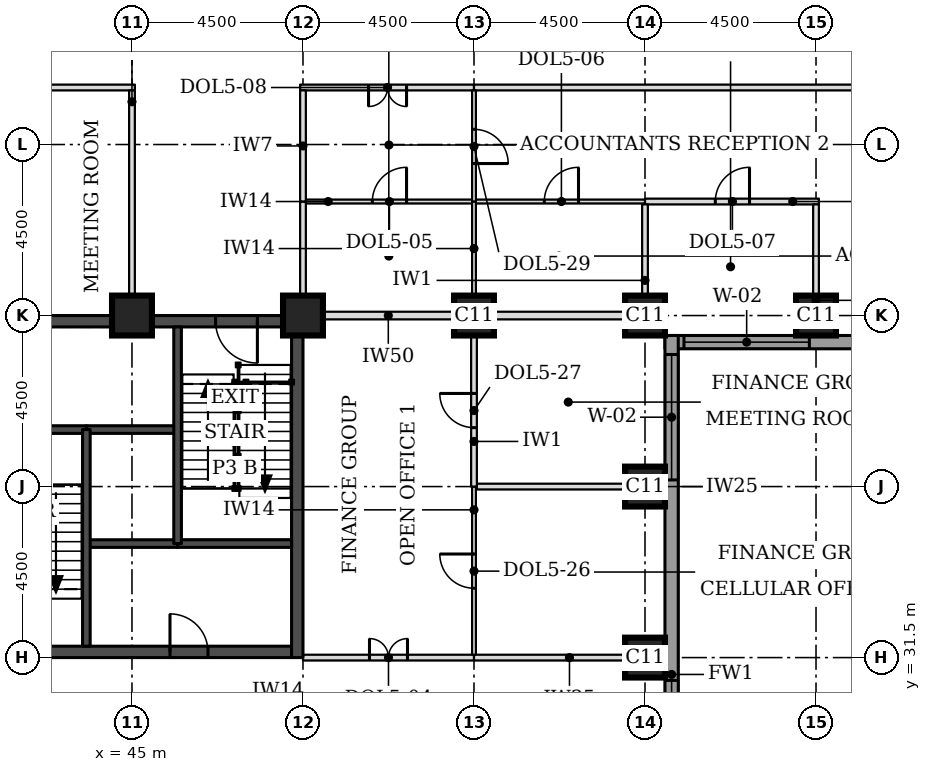
"""IFC4 building model, lengths in metres.
Left out: names, types, materials, properties, quantities, classifications, styles, units other than length and angle.
Written with IfcOpenShell. Run it as: python <this file> out.ifc"""

import sys

from ifc_helpers import new_model, si_unit, direction, frame, frame_2d, origin, origin_2d, place, context, subcontext, project, spatial, rectangle, extrude, element, fill, save


model = new_model("IFC4")
c1 = context("Model", 3, precision=1e-05, world=origin(), true_north=direction((0.0, 1.0)))
c2 = subcontext(c1, "Body", "Model", "MODEL_VIEW")
j1 = project(units=[si_unit("LENGTHUNIT", "METRE"), si_unit("PLANEANGLEUNIT", "RADIAN")], contexts=[c1])
p1 = place(None, origin())
s1 = spatial("IfcSite", under=j1, at=p1, CompositionType="ELEMENT")
p2 = place(p1, origin())
s2 = spatial("IfcBuilding", under=s1, at=p2, CompositionType="ELEMENT")
p3 = place(p2, frame((0.0, 0.0, 108.5)))
s3 = spatial("IfcBuildingStorey", under=s2, at=p3, CompositionType="ELEMENT", Elevation=108.5)
for number, where, z_axis, x_axis in (
    (1, (58.5, 31.5, 0.0), (0.0, 0.0, 1.0), (1.0, 0.0, 0.0)),
    (2, (58.5, 36.0, 0.0), (0.0, 0.0, 1.0), (1.0, 0.0, 0.0)),
    (3, (45.0, 40.5, 0.0), (0.0, 0.0, 1.0), (1.0, 0.0, 0.0)),
    (4, (49.5, 40.5, 0.0), (0.0, 0.0, 1.0), (1.0, 0.0, 0.0)),
    (5, (54.0, 40.5, 0.0), (0.0, 0.0, 1.0), (1.0, 0.0, 0.0)),
    (6, (58.5, 40.5, 0.0), (0.0, 0.0, 1.0), (1.0, 0.0, 0.0)),
    (7, (63.0, 40.5, 0.0), (0.0, 0.0, 1.0), (1.0, 0.0, 0.0)),
):
    element("IfcColumn", number, at=place(p3, frame(where, z_axis=z_axis, x_axis=x_axis)), inside=s3, PredefinedType="COLUMN", context=c2, shape_type="SweptSolid", body=[
        extrude(rectangle(XDim=1.05, YDim=1.05, at=origin_2d()), origin(), (0.0, 0.0, 1.0), 3.7),
    ])
p4 = place(p3, frame((40.8, 31.65, 0.0), z_axis=(0.0, 0.0, 1.0), x_axis=(1.0, 0.0, 0.0)))
e8 = element("IfcWall", 8, at=p4, inside=s3, PredefinedType="SHEAR", context=c2, shape_type="SweptSolid", body=[
    extrude(rectangle(XDim=8.4, YDim=0.3, at=frame_2d((4.2, 0.0))), origin(), (0.0, 0.0, 1.0), 3.7),
])
p5 = place(p4, frame((5.2, 0.0, 0.0)))
e9 = element("IfcOpeningElement", 9, at=p5, cuts=e8, PredefinedType="OPENING", context=c2, shape_type="SweptSolid", body=[
    extrude(rectangle(XDim=1.0, YDim=2.1, at=frame_2d((0.5, 1.05))), frame((0.0, 0.16, 0.0), z_axis=(0.0, -1.0, 0.0), x_axis=(1.0, 0.0, 0.0)), (0.0, 0.0, 1.0), 0.32),
])
p6 = place(p3, frame((40.8, 40.35, 0.0), z_axis=(0.0, 0.0, 1.0), x_axis=(1.0, 0.0, 0.0)))
e10 = element("IfcWall", 10, at=p6, inside=s3, PredefinedType="SHEAR", context=c2, shape_type="SweptSolid", body=[
    extrude(rectangle(XDim=8.4, YDim=0.3, at=frame_2d((4.2, 0.0))), origin(), (0.0, 0.0, 1.0), 3.7),
])
p7 = place(p6, frame((6.4, 0.0, 0.0)))
e11 = element("IfcOpeningElement", 11, at=p7, cuts=e10, PredefinedType="OPENING", context=c2, shape_type="SweptSolid", body=[
    extrude(rectangle(XDim=1.1, YDim=2.1, at=frame_2d((0.55, 1.05))), frame((0.0, 0.16, 0.0), z_axis=(0.0, -1.0, 0.0), x_axis=(1.0, 0.0, 0.0)), (0.0, 0.0, 1.0), 0.32),
])
p8 = place(p3, frame((49.35, 31.5, 0.0), z_axis=(0.0, 0.0, 1.0), x_axis=(0.0, 1.0, 0.0)))
e12 = element("IfcWall", 12, at=p8, inside=s3, PredefinedType="SHEAR", context=c2, shape_type="SweptSolid", body=[
    extrude(rectangle(XDim=9.0, YDim=0.3, at=frame_2d((4.5, 0.0))), origin(), (0.0, 0.0, 1.0), 3.7),
])
p9 = place(p3, frame((59.025, 39.8, 0.0), z_axis=(0.0, 0.0, 1.0), x_axis=(1.0, 0.0, 0.0)))
e13 = element("IfcWall", 13, at=p9, inside=s3, PredefinedType="STANDARD", context=c2, shape_type="SweptSolid", body=[
    extrude(rectangle(XDim=13.337, YDim=0.35, at=frame_2d((6.669, 0.0))), origin(), (0.0, 0.0, 1.0), 3.525),
])
p10 = place(p9, frame((0.5, 0.0, 0.9)))
e14 = element("IfcOpeningElement", 14, at=p10, cuts=e13, PredefinedType="OPENING", context=c2, shape_type="SweptSolid", body=[
    extrude(rectangle(XDim=3.3, YDim=1.9, at=frame_2d((1.65, 0.95))), frame((0.0, 0.185, 0.0), z_axis=(0.0, -1.0, 0.0), x_axis=(1.0, 0.0, 0.0)), (0.0, 0.0, 1.0), 0.37),
])
p11 = place(p3, frame((59.2, 22.138, 0.0), z_axis=(0.0, 0.0, 1.0), x_axis=(0.0, 1.0, 0.0)))
e15 = element("IfcWall", 15, at=p11, inside=s3, PredefinedType="STANDARD", context=c2, shape_type="SweptSolid", body=[
    extrude(rectangle(XDim=17.837, YDim=0.35, at=frame_2d((8.919, 0.0))), origin(), (0.0, 0.0, 1.0), 3.525),
])
p12 = place(p11, frame((5.462, 0.0, 0.9)))
e16 = element("IfcOpeningElement", 16, at=p12, cuts=e15, PredefinedType="OPENING", context=c2, shape_type="SweptSolid", body=[
    extrude(rectangle(XDim=3.3, YDim=1.9, at=frame_2d((1.65, 0.95))), frame((0.0, 0.185, 0.0), z_axis=(0.0, -1.0, 0.0), x_axis=(1.0, 0.0, 0.0)), (0.0, 0.0, 1.0), 0.37),
])
p13 = place(p11, frame((14.037, 0.0, 0.9)))
e17 = element("IfcOpeningElement", 17, at=p13, cuts=e15, PredefinedType="OPENING", context=c2, shape_type="SweptSolid", body=[
    extrude(rectangle(XDim=3.3, YDim=1.9, at=frame_2d((1.65, 0.95))), frame((0.0, 0.185, 0.0), z_axis=(0.0, -1.0, 0.0), x_axis=(1.0, 0.0, 0.0)), (0.0, 0.0, 1.0), 0.37),
])
p14 = place(p3, frame((49.5, 31.5, 0.0), z_axis=(0.0, 0.0, 1.0), x_axis=(1.0, 0.0, 0.0)))
e18 = element("IfcWall", 18, at=p14, inside=s3, PredefinedType="PARTITIONING", context=c2, shape_type="SweptSolid", body=[
    extrude(rectangle(XDim=4.5, YDim=0.15, at=frame_2d((2.25, 0.0))), origin(), (0.0, 0.0, 1.0), 2.55),
])
p15 = place(p14, frame((1.75, 0.0, 0.0)))
e19 = element("IfcOpeningElement", 19, at=p15, cuts=e18, PredefinedType="OPENING", context=c2, shape_type="SweptSolid", body=[
    extrude(rectangle(XDim=1.0, YDim=2.1, at=frame_2d((0.5, 1.05))), frame((0.0, 0.085, 0.0), z_axis=(0.0, -1.0, 0.0), x_axis=(1.0, 0.0, 0.0)), (0.0, 0.0, 1.0), 0.17),
])
p16 = place(p3, frame((54.0, 31.5, 0.0), z_axis=(0.0, 0.0, 1.0), x_axis=(1.0, 0.0, 0.0)))
e20 = element("IfcWall", 20, at=p16, inside=s3, PredefinedType="PARTITIONING", context=c2, shape_type="SweptSolid", body=[
    extrude(rectangle(XDim=5.025, YDim=0.15, at=frame_2d((2.512, 0.0))), origin(), (0.0, 0.0, 1.0), 2.55),
])
p17 = place(p3, frame((54.075, 36.0, 0.0), z_axis=(0.0, 0.0, 1.0), x_axis=(1.0, 0.0, 0.0)))
e21 = element("IfcWall", 21, at=p17, inside=s3, PredefinedType="PARTITIONING", context=c2, shape_type="SweptSolid", body=[
    extrude(rectangle(XDim=4.95, YDim=0.15, at=frame_2d((2.475, 0.0))), origin(), (0.0, 0.0, 1.0), 3.096),
])
p18 = place(p3, frame((50.015, 40.5, 0.0), z_axis=(0.0, 0.0, 1.0), x_axis=(1.0, 0.0, 0.0)))
e22 = element("IfcWall", 22, at=p18, inside=s3, PredefinedType="PARTITIONING", context=c2, shape_type="SweptSolid", body=[
    extrude(rectangle(XDim=3.46, YDim=0.2, at=frame_2d((1.73, 0.0))), origin(), (0.0, 0.0, 1.0), 2.8),
])
p19 = place(p3, frame((54.495, 40.5, 0.0), z_axis=(0.0, 0.0, 1.0), x_axis=(1.0, 0.0, 0.0)))
e23 = element("IfcWall", 23, at=p19, inside=s3, PredefinedType="PARTITIONING", context=c2, shape_type="SweptSolid", body=[
    extrude(rectangle(XDim=3.48, YDim=0.2, at=frame_2d((1.74, 0.0))), origin(), (0.0, 0.0, 1.0), 2.8),
])
p20 = place(p3, frame((49.575, 43.5, 0.0), z_axis=(0.0, 0.0, 1.0), x_axis=(1.0, 0.0, 0.0)))
e24 = element("IfcWall", 24, at=p20, inside=s3, PredefinedType="PARTITIONING", context=c2, shape_type="SweptSolid", body=[
    extrude(rectangle(XDim=4.375, YDim=0.1, at=frame_2d((2.188, 0.0))), origin(), (0.0, 0.0, 1.0), 3.55),
])
p21 = place(p20, frame((1.75, 0.0, 0.0)))
e25 = element("IfcOpeningElement", 25, at=p21, cuts=e24, PredefinedType="OPENING", context=c2, shape_type="SweptSolid", body=[
    extrude(rectangle(XDim=0.9, YDim=2.1, at=frame_2d((0.45, 1.05))), frame((0.0, 0.06, 0.0), z_axis=(0.0, -1.0, 0.0), x_axis=(1.0, 0.0, 0.0)), (0.0, 0.0, 1.0), 0.12),
])
p22 = place(p3, frame((54.05, 43.5, 0.0), z_axis=(0.0, 0.0, 1.0), x_axis=(1.0, 0.0, 0.0)))
e26 = element("IfcWall", 26, at=p22, inside=s3, PredefinedType="PARTITIONING", context=c2, shape_type="SweptSolid", body=[
    extrude(rectangle(XDim=4.45, YDim=0.1, at=frame_2d((2.225, 0.0))), origin(), (0.0, 0.0, 1.0), 3.55),
])
p23 = place(p22, frame((1.8, 0.0, 0.0)))
e27 = element("IfcOpeningElement", 27, at=p23, cuts=e26, PredefinedType="OPENING", context=c2, shape_type="SweptSolid", body=[
    extrude(rectangle(XDim=0.9, YDim=2.1, at=frame_2d((0.45, 1.05))), frame((0.0, 0.06, 0.0), z_axis=(0.0, -1.0, 0.0), x_axis=(1.0, 0.0, 0.0)), (0.0, 0.0, 1.0), 0.12),
])
p24 = place(p3, frame((58.5, 43.5, 0.0), z_axis=(0.0, 0.0, 1.0), x_axis=(1.0, 0.0, 0.0)))
e28 = element("IfcWall", 28, at=p24, inside=s3, PredefinedType="PARTITIONING", context=c2, shape_type="SweptSolid", body=[
    extrude(rectangle(XDim=4.575, YDim=0.15, at=frame_2d((2.288, 0.0))), origin(), (0.0, 0.0, 1.0), 3.55),
])
p25 = place(p24, frame((1.85, 0.0, 0.0)))
e29 = element("IfcOpeningElement", 29, at=p25, cuts=e28, PredefinedType="OPENING", context=c2, shape_type="SweptSolid", body=[
    extrude(rectangle(XDim=0.9, YDim=2.1, at=frame_2d((0.45, 1.05))), frame((0.0, 0.085, 0.0), z_axis=(0.0, -1.0, 0.0), x_axis=(1.0, 0.0, 0.0)), (0.0, 0.0, 1.0), 0.17),
])
p26 = place(p3, frame((40.425, 46.5, 0.0), z_axis=(0.0, 0.0, 1.0), x_axis=(1.0, 0.0, 0.0)))
e30 = element("IfcWall", 30, at=p26, inside=s3, PredefinedType="PARTITIONING", context=c2, shape_type="SweptSolid", body=[
    extrude(rectangle(XDim=4.65, YDim=0.15, at=frame_2d((2.325, 0.0))), origin(), (0.0, 0.0, 1.0), 3.55),
])
p27 = place(p3, frame((49.425, 46.5, 0.0), z_axis=(0.0, 0.0, 1.0), x_axis=(1.0, 0.0, 0.0)))
e31 = element("IfcWall", 31, at=p27, inside=s3, PredefinedType="PARTITIONING", context=c2, shape_type="SweptSolid", body=[
    extrude(rectangle(XDim=4.575, YDim=0.15, at=frame_2d((2.288, 0.0))), origin(), (0.0, 0.0, 1.0), 3.55),
])
p28 = place(p27, frame((1.8, 0.0, 0.0)))
e32 = element("IfcOpeningElement", 32, at=p28, cuts=e31, PredefinedType="OPENING", context=c2, shape_type="SweptSolid", body=[
    extrude(rectangle(XDim=1.0, YDim=2.1, at=frame_2d((0.5, 1.05))), frame((0.0, 0.085, 0.0), z_axis=(0.0, -1.0, 0.0), x_axis=(1.0, 0.0, 0.0)), (0.0, 0.0, 1.0), 0.17),
])
p29 = place(p3, frame((54.0, 46.5, 0.0), z_axis=(0.0, 0.0, 1.0), x_axis=(1.0, 0.0, 0.0)))
e33 = element("IfcWall", 33, at=p29, inside=s3, PredefinedType="PARTITIONING", context=c2, shape_type="SweptSolid", body=[
    extrude(rectangle(XDim=16.5, YDim=0.15, at=frame_2d((8.25, 0.0))), origin(), (0.0, 0.0, 1.0), 3.55),
])
p30 = place(p3, frame((54.0, 31.575, 0.0), z_axis=(0.0, 0.0, 1.0), x_axis=(0.0, 1.0, 0.0)))
e34 = element("IfcWall", 34, at=p30, inside=s3, PredefinedType="PARTITIONING", context=c2, shape_type="SweptSolid", body=[
    extrude(rectangle(XDim=4.425, YDim=0.1, at=frame_2d((2.212, 0.0))), origin(), (0.0, 0.0, 1.0), 3.55),
])
p31 = place(p30, frame((1.75, 0.0, 0.0)))
e35 = element("IfcOpeningElement", 35, at=p31, cuts=e34, PredefinedType="OPENING", context=c2, shape_type="SweptSolid", body=[
    extrude(rectangle(XDim=0.9, YDim=2.1, at=frame_2d((0.45, 1.05))), frame((0.0, 0.06, 0.0), z_axis=(0.0, -1.0, 0.0), x_axis=(1.0, 0.0, 0.0)), (0.0, 0.0, 1.0), 0.12),
])
p32 = place(p3, frame((54.0, 36.0, 0.0), z_axis=(0.0, 0.0, 1.0), x_axis=(0.0, 1.0, 0.0)))
e36 = element("IfcWall", 36, at=p32, inside=s3, PredefinedType="PARTITIONING", context=c2, shape_type="SweptSolid", body=[
    extrude(rectangle(XDim=3.975, YDim=0.15, at=frame_2d((1.988, 0.0))), origin(), (0.0, 0.0, 1.0), 3.55),
])
p33 = place(p32, frame((1.55, 0.0, 0.0)))
e37 = element("IfcOpeningElement", 37, at=p33, cuts=e36, PredefinedType="OPENING", context=c2, shape_type="SweptSolid", body=[
    extrude(rectangle(XDim=0.9, YDim=2.1, at=frame_2d((0.45, 1.05))), frame((0.0, 0.085, 0.0), z_axis=(0.0, -1.0, 0.0), x_axis=(1.0, 0.0, 0.0)), (0.0, 0.0, 1.0), 0.17),
])
p34 = place(p3, frame((63.0, 39.975, 0.0), z_axis=(0.0, 0.0, 1.0), x_axis=(0.0, 1.0, 0.0)))
e38 = element("IfcWall", 38, at=p34, inside=s3, PredefinedType="PARTITIONING", context=c2, shape_type="SweptSolid", body=[
    extrude(rectangle(XDim=3.45, YDim=0.15, at=frame_2d((1.725, 0.0))), origin(), (0.0, 0.0, 1.0), 3.55),
])
p35 = place(p3, frame((45.0, 41.025, 0.0), z_axis=(0.0, 0.0, 1.0), x_axis=(0.0, 1.0, 0.0)))
e39 = element("IfcWall", 39, at=p35, inside=s3, PredefinedType="PARTITIONING", context=c2, shape_type="SweptSolid", body=[
    extrude(rectangle(XDim=5.4, YDim=0.15, at=frame_2d((2.7, 0.0))), origin(), (0.0, 0.0, 1.0), 3.55),
])
p36 = place(p3, frame((49.5, 41.025, 0.0), z_axis=(0.0, 0.0, 1.0), x_axis=(0.0, 1.0, 0.0)))
e40 = element("IfcWall", 40, at=p36, inside=s3, PredefinedType="PARTITIONING", context=c2, shape_type="SweptSolid", body=[
    extrude(rectangle(XDim=2.475, YDim=0.15, at=frame_2d((1.238, 0.0))), origin(), (0.0, 0.0, 1.0), 3.55),
])
p37 = place(p3, frame((54.0, 41.025, 0.0), z_axis=(0.0, 0.0, 1.0), x_axis=(0.0, 1.0, 0.0)))
e41 = element("IfcWall", 41, at=p37, inside=s3, PredefinedType="PARTITIONING", context=c2, shape_type="SweptSolid", body=[
    extrude(rectangle(XDim=2.475, YDim=0.1, at=frame_2d((1.238, 0.0))), origin(), (0.0, 0.0, 1.0), 3.55),
])
p38 = place(p3, frame((58.5, 41.025, 0.0), z_axis=(0.0, 0.0, 1.0), x_axis=(0.0, 1.0, 0.0)))
e42 = element("IfcWall", 42, at=p38, inside=s3, PredefinedType="PARTITIONING", context=c2, shape_type="SweptSolid", body=[
    extrude(rectangle(XDim=2.4, YDim=0.15, at=frame_2d((1.2, 0.0))), origin(), (0.0, 0.0, 1.0), 3.55),
])
p39 = place(p3, frame((49.5, 43.5, 0.0), z_axis=(0.0, 0.0, 1.0), x_axis=(0.0, 1.0, 0.0)))
e43 = element("IfcWall", 43, at=p39, inside=s3, PredefinedType="PARTITIONING", context=c2, shape_type="SweptSolid", body=[
    extrude(rectangle(XDim=2.925, YDim=0.15, at=frame_2d((1.462, 0.0))), origin(), (0.0, 0.0, 1.0), 3.55),
])
p40 = place(p3, frame((54.0, 43.5, 0.0), z_axis=(0.0, 0.0, 1.0), x_axis=(0.0, 1.0, 0.0)))
e44 = element("IfcWall", 44, at=p40, inside=s3, PredefinedType="PARTITIONING", context=c2, shape_type="SweptSolid", body=[
    extrude(rectangle(XDim=2.925, YDim=0.1, at=frame_2d((1.462, 0.0))), origin(), (0.0, 0.0, 1.0), 3.55),
])
p41 = place(p40, frame((1.0, 0.0, 0.0)))
e45 = element("IfcOpeningElement", 45, at=p41, cuts=e44, PredefinedType="OPENING", context=c2, shape_type="SweptSolid", body=[
    extrude(rectangle(XDim=0.9, YDim=2.1, at=frame_2d((0.45, 1.05))), frame((0.0, 0.06, 0.0), z_axis=(0.0, -1.0, 0.0), x_axis=(1.0, 0.0, 0.0)), (0.0, 0.0, 1.0), 0.12),
])
p42 = place(p3, frame((43.8, 34.5, 0.0), z_axis=(0.0, 0.0, 1.0), x_axis=(1.0, 0.0, 0.0)))
e46 = element("IfcWall", 46, at=p42, inside=s3, PredefinedType="SOLIDWALL", context=c2, shape_type="SweptSolid", body=[
    extrude(rectangle(XDim=2.4, YDim=0.2, at=frame_2d((1.2, 0.0))), origin(), (0.0, 0.0, 1.0), 3.55),
])
p43 = place(p3, frame((46.2, 34.5, 0.0), z_axis=(0.0, 0.0, 1.0), x_axis=(1.0, 0.0, 0.0)))
e47 = element("IfcWall", 47, at=p43, inside=s3, PredefinedType="SOLIDWALL", context=c2, shape_type="SweptSolid", body=[
    extrude(rectangle(XDim=3.0, YDim=0.2, at=frame_2d((1.5, 0.0))), origin(), (0.0, 0.0, 1.0), 3.55),
])
p44 = place(p3, frame((43.8, 37.5, 0.0), z_axis=(0.0, 0.0, 1.0), x_axis=(1.0, 0.0, 0.0)))
e48 = element("IfcWall", 48, at=p44, inside=s3, PredefinedType="SOLIDWALL", context=c2, shape_type="SweptSolid", body=[
    extrude(rectangle(XDim=2.4, YDim=0.2, at=frame_2d((1.2, 0.0))), origin(), (0.0, 0.0, 1.0), 3.7),
])
p45 = place(p3, frame((40.8, 37.5, 0.0), z_axis=(0.0, 0.0, 1.0), x_axis=(1.0, 0.0, 0.0)))
e49 = element("IfcWall", 49, at=p45, inside=s3, PredefinedType="SOLIDWALL", context=c2, shape_type="SweptSolid", body=[
    extrude(rectangle(XDim=3.0, YDim=0.2, at=frame_2d((1.5, 0.0))), origin(), (0.0, 0.0, 1.0), 3.55),
])
for number, where, z_axis, x_axis in (
    (50, (43.8, 31.8, 0.0), (0.0, 0.0, 1.0), (0.0, 1.0, 0.0)),
    (51, (46.2, 34.5, 0.0), (0.0, 0.0, 1.0), (0.0, 1.0, 0.0)),
):
    element("IfcWall", number, at=place(p3, frame(where, z_axis=z_axis, x_axis=x_axis)), inside=s3, PredefinedType="SOLIDWALL", context=c2, shape_type="SweptSolid", body=[
        extrude(rectangle(XDim=5.7, YDim=0.2, at=frame_2d((2.85, 0.0))), origin(), (0.0, 0.0, 1.0), 3.55),
    ])
p46 = place(p10, origin())
e52 = element("IfcWindow", 52, at=p46, inside=s3, PartitioningType="SINGLE_PANEL", PredefinedType="WINDOW", context=c2, shape_type="SweptSolid", body=[
    extrude(rectangle(XDim=3.3, YDim=1.9, at=frame_2d((1.65, 0.95))), frame((0.0, 0.085, 0.0), z_axis=(0.0, -1.0, 0.0), x_axis=(1.0, 0.0, 0.0)), (0.0, 0.0, 1.0), 0.06),
])
fill(e14, e52)
p47 = place(p12, origin())
e53 = element("IfcWindow", 53, at=p47, inside=s3, PartitioningType="SINGLE_PANEL", PredefinedType="WINDOW", context=c2, shape_type="SweptSolid", body=[
    extrude(rectangle(XDim=3.3, YDim=1.9, at=frame_2d((1.65, 0.95))), frame((0.0, 0.085, 0.0), z_axis=(0.0, -1.0, 0.0), x_axis=(1.0, 0.0, 0.0)), (0.0, 0.0, 1.0), 0.06),
])
fill(e16, e53)
p48 = place(p13, origin())
e54 = element("IfcWindow", 54, at=p48, inside=s3, PartitioningType="SINGLE_PANEL", PredefinedType="WINDOW", context=c2, shape_type="SweptSolid", body=[
    extrude(rectangle(XDim=3.3, YDim=1.9, at=frame_2d((1.65, 0.95))), frame((0.0, 0.085, 0.0), z_axis=(0.0, -1.0, 0.0), x_axis=(1.0, 0.0, 0.0)), (0.0, 0.0, 1.0), 0.06),
])
fill(e17, e54)
p49 = place(p15, origin())
e55 = element("IfcDoor", 55, at=p49, inside=s3, OperationType="DOUBLE_DOOR_SINGLE_SWING", PredefinedType="DOOR", context=c2, shape_type="SweptSolid", body=[
    extrude(rectangle(XDim=1.0, YDim=2.1, at=frame_2d((0.5, 1.05))), frame((0.0, 0.025, 0.0), z_axis=(0.0, -1.0, 0.0), x_axis=(1.0, 0.0, 0.0)), (0.0, 0.0, 1.0), 0.05),
])
fill(e19, e55)
p50 = place(p31, origin())
e56 = element("IfcDoor", 56, at=p50, inside=s3, OperationType="SINGLE_SWING_RIGHT", PredefinedType="DOOR", context=c2, shape_type="SweptSolid", body=[
    extrude(rectangle(XDim=0.9, YDim=2.1, at=frame_2d((0.45, 1.05))), frame((0.0, 0.025, 0.0), z_axis=(0.0, -1.0, 0.0), x_axis=(1.0, 0.0, 0.0)), (0.0, 0.0, 1.0), 0.05),
])
fill(e35, e56)
p51 = place(p33, origin())
e57 = element("IfcDoor", 57, at=p51, inside=s3, OperationType="SINGLE_SWING_RIGHT", PredefinedType="DOOR", context=c2, shape_type="SweptSolid", body=[
    extrude(rectangle(XDim=0.9, YDim=2.1, at=frame_2d((0.45, 1.05))), frame((0.0, 0.025, 0.0), z_axis=(0.0, -1.0, 0.0), x_axis=(1.0, 0.0, 0.0)), (0.0, 0.0, 1.0), 0.05),
])
fill(e37, e57)
p52 = place(p28, frame((1.0, 0.0, 0.0), z_axis=(0.0, 0.0, 1.0), x_axis=(-1.0, 0.0, 0.0)))
e58 = element("IfcDoor", 58, at=p52, inside=s3, OperationType="DOUBLE_DOOR_SINGLE_SWING", PredefinedType="DOOR", context=c2, shape_type="SweptSolid", body=[
    extrude(rectangle(XDim=1.0, YDim=2.1, at=frame_2d((0.5, 1.05))), frame((0.0, 0.025, 0.0), z_axis=(0.0, -1.0, 0.0), x_axis=(1.0, 0.0, 0.0)), (0.0, 0.0, 1.0), 0.05),
])
fill(e32, e58)
p53 = place(p41, frame((0.9, 0.0, 0.0), z_axis=(0.0, 0.0, 1.0), x_axis=(-1.0, 0.0, 0.0)))
e59 = element("IfcDoor", 59, at=p53, inside=s3, OperationType="SINGLE_SWING_RIGHT", PredefinedType="DOOR", context=c2, shape_type="SweptSolid", body=[
    extrude(rectangle(XDim=0.9, YDim=2.1, at=frame_2d((0.45, 1.05))), frame((0.0, 0.025, 0.0), z_axis=(0.0, -1.0, 0.0), x_axis=(1.0, 0.0, 0.0)), (0.0, 0.0, 1.0), 0.05),
])
fill(e45, e59)
p54 = place(p21, origin())
e60 = element("IfcDoor", 60, at=p54, inside=s3, OperationType="SINGLE_SWING_RIGHT", PredefinedType="DOOR", context=c2, shape_type="SweptSolid", body=[
    extrude(rectangle(XDim=0.9, YDim=2.1, at=frame_2d((0.45, 1.05))), frame((0.0, 0.025, 0.0), z_axis=(0.0, -1.0, 0.0), x_axis=(1.0, 0.0, 0.0)), (0.0, 0.0, 1.0), 0.05),
])
fill(e25, e60)
p55 = place(p23, origin())
e61 = element("IfcDoor", 61, at=p55, inside=s3, OperationType="SINGLE_SWING_RIGHT", PredefinedType="DOOR", context=c2, shape_type="SweptSolid", body=[
    extrude(rectangle(XDim=0.9, YDim=2.1, at=frame_2d((0.45, 1.05))), frame((0.0, 0.025, 0.0), z_axis=(0.0, -1.0, 0.0), x_axis=(1.0, 0.0, 0.0)), (0.0, 0.0, 1.0), 0.05),
])
fill(e27, e61)
p56 = place(p25, origin())
e62 = element("IfcDoor", 62, at=p56, inside=s3, OperationType="SINGLE_SWING_RIGHT", PredefinedType="DOOR", context=c2, shape_type="SweptSolid", body=[
    extrude(rectangle(XDim=0.9, YDim=2.1, at=frame_2d((0.45, 1.05))), frame((0.0, 0.025, 0.0), z_axis=(0.0, -1.0, 0.0), x_axis=(1.0, 0.0, 0.0)), (0.0, 0.0, 1.0), 0.05),
])
fill(e29, e62)
p57 = place(p7, frame((1.1, 0.0, 0.0), z_axis=(0.0, 0.0, 1.0), x_axis=(-1.0, 0.0, 0.0)))
e63 = element("IfcDoor", 63, at=p57, inside=s3, OperationType="SINGLE_SWING_LEFT", PredefinedType="DOOR", context=c2, shape_type="SweptSolid", body=[
    extrude(rectangle(XDim=1.1, YDim=2.1, at=frame_2d((0.55, 1.05))), frame((0.0, 0.025, 0.0), z_axis=(0.0, -1.0, 0.0), x_axis=(1.0, 0.0, 0.0)), (0.0, 0.0, 1.0), 0.05),
])
fill(e11, e63)
p58 = place(p5, origin())
e64 = element("IfcDoor", 64, at=p58, inside=s3, OperationType="SINGLE_SWING_LEFT", PredefinedType="DOOR", context=c2, shape_type="SweptSolid", body=[
    extrude(rectangle(XDim=1.0, YDim=2.1, at=frame_2d((0.5, 1.05))), frame((0.0, 0.025, 0.0), z_axis=(0.0, -1.0, 0.0), x_axis=(1.0, 0.0, 0.0)), (0.0, 0.0, 1.0), 0.05),
])
fill(e9, e64)
save(model, sys.argv[1])
